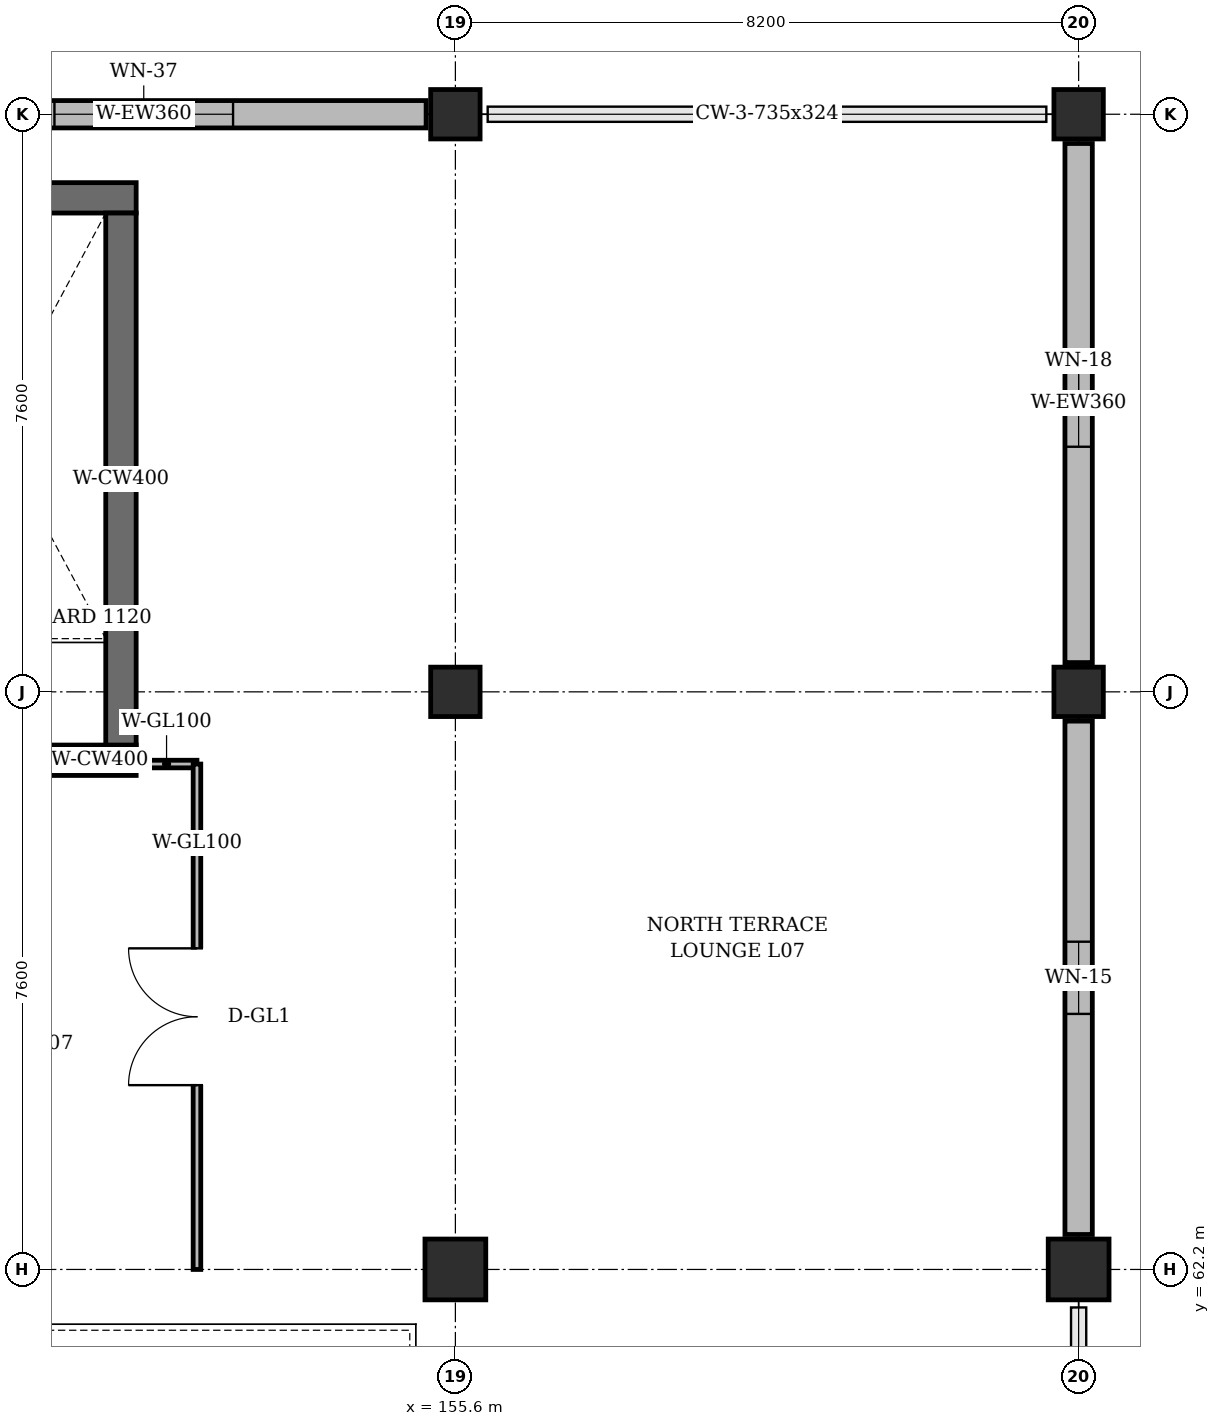
"""IFC4 building model, lengths in metres.
Left out: names, types, materials, properties, quantities, classifications, styles, units other than length and angle.
Written with IfcOpenShell. Run it as: python <this file> out.ifc"""

import sys

from ifc_helpers import new_model, si_unit, direction, frame, frame_2d, origin, origin_2d, place, context, subcontext, project, spatial, rectangle, extrude, element, fill, save


model = new_model("IFC4")
c1 = context("Model", 3, precision=1e-05, world=origin(), true_north=direction((0.0, 1.0)))
c2 = subcontext(c1, "Body", "Model", "MODEL_VIEW")
j1 = project(units=[si_unit("LENGTHUNIT", "METRE"), si_unit("PLANEANGLEUNIT", "RADIAN")], contexts=[c1])
p1 = place(None, origin())
s1 = spatial("IfcSite", under=j1, at=p1, CompositionType="ELEMENT")
p2 = place(p1, origin())
s2 = spatial("IfcBuilding", under=s1, at=p2, CompositionType="ELEMENT")
p3 = place(p2, frame((0.0, 0.0, 32.4)))
s3 = spatial("IfcBuildingStorey", under=s2, at=p3, CompositionType="ELEMENT", Elevation=32.4)
p4 = place(p3, frame((155.6, 62.2, 0.0), z_axis=(0.0, 0.0, 1.0), x_axis=(1.0, 0.0, 0.0)))
e1 = element("IfcColumn", 1, at=p4, inside=s3, PredefinedType="COLUMN", context=c2, shape_type="SweptSolid", body=[
    extrude(rectangle(XDim=0.8, YDim=0.8, at=origin_2d()), origin(), (0.0, 0.0, 1.0), 3.89),
])
for number, where, z_axis, x_axis in (
    (2, (155.6, 69.8, 0.0), (0.0, 0.0, 1.0), (1.0, 0.0, 0.0)),
    (3, (155.6, 77.4, 0.0), (0.0, 0.0, 1.0), (1.0, 0.0, 0.0)),
):
    element("IfcColumn", number, at=place(p3, frame(where, z_axis=z_axis, x_axis=x_axis)), inside=s3, PredefinedType="COLUMN", context=c2, shape_type="SweptSolid", body=[
        extrude(rectangle(XDim=0.65, YDim=0.65, at=origin_2d()), origin(), (0.0, 0.0, 1.0), 3.84),
    ])
p5 = place(p3, frame((163.8, 62.2, 0.0), z_axis=(0.0, 0.0, 1.0), x_axis=(1.0, 0.0, 0.0)))
e4 = element("IfcColumn", 4, at=p5, inside=s3, PredefinedType="COLUMN", context=c2, shape_type="SweptSolid", body=[
    extrude(rectangle(XDim=0.8, YDim=0.8, at=origin_2d()), origin(), (0.0, 0.0, 1.0), 3.89),
])
p6 = place(p3, frame((163.8, 69.8, 0.0), z_axis=(0.0, 0.0, 1.0), x_axis=(1.0, 0.0, 0.0)))
e5 = element("IfcColumn", 5, at=p6, inside=s3, PredefinedType="COLUMN", context=c2, shape_type="SweptSolid", body=[
    extrude(rectangle(XDim=0.65, YDim=0.65, at=origin_2d()), origin(), (0.0, 0.0, 1.0), 3.84),
])
p7 = place(p3, frame((163.8, 77.4, 0.0), z_axis=(0.0, 0.0, 1.0), x_axis=(1.0, 0.0, 0.0)))
e6 = element("IfcColumn", 6, at=p7, inside=s3, PredefinedType="COLUMN", context=c2, shape_type="SweptSolid", body=[
    extrude(rectangle(XDim=0.65, YDim=0.65, at=origin_2d()), origin(), (0.0, 0.0, 1.0), 3.945),
])
p8 = place(p3, frame((163.8, 62.66, 0.0), z_axis=(0.0, 0.0, 1.0), x_axis=(0.0, 1.0, 0.0)))
e7 = element("IfcWall", 7, at=p8, inside=s3, PredefinedType="SOLIDWALL", context=c2, shape_type="SweptSolid", body=[
    extrude(rectangle(XDim=6.755, YDim=0.36, at=frame_2d((3.377, 0.0))), origin(), (0.0, 0.0, 1.0), 3.275),
])
p9 = place(p8, frame((2.903, 0.0, 0.95)))
e8 = element("IfcOpeningElement", 8, at=p9, cuts=e7, PredefinedType="OPENING", context=c2, shape_type="SweptSolid", body=[
    extrude(rectangle(XDim=0.95, YDim=1.75, at=frame_2d((0.475, 0.875))), frame((0.0, 0.192, 0.0), z_axis=(0.0, -1.0, 0.0), x_axis=(1.0, 0.0, 0.0)), (0.0, 0.0, 1.0), 0.384),
])
p10 = place(p3, frame((163.8, 70.185, 0.0), z_axis=(0.0, 0.0, 1.0), x_axis=(0.0, 1.0, 0.0)))
e9 = element("IfcWall", 9, at=p10, inside=s3, PredefinedType="SOLIDWALL", context=c2, shape_type="SweptSolid", body=[
    extrude(rectangle(XDim=6.83, YDim=0.36, at=frame_2d((3.415, 0.0))), origin(), (0.0, 0.0, 1.0), 3.225),
])
p11 = place(p10, frame((2.84, 0.0, 0.95)))
e10 = element("IfcOpeningElement", 10, at=p11, cuts=e9, PredefinedType="OPENING", context=c2, shape_type="SweptSolid", body=[
    extrude(rectangle(XDim=1.15, YDim=1.5, at=frame_2d((0.575, 0.75))), frame((0.0, 0.192, 0.0), z_axis=(0.0, -1.0, 0.0), x_axis=(1.0, 0.0, 0.0)), (0.0, 0.0, 1.0), 0.384),
])
p12 = place(p3, frame((155.215, 77.4, 0.0), z_axis=(0.0, 0.0, 1.0), x_axis=(-1.0, 0.0, 0.0)))
e11 = element("IfcWall", 11, at=p12, inside=s3, PredefinedType="SOLIDWALL", context=c2, shape_type="SweptSolid", body=[
    extrude(rectangle(XDim=7.43, YDim=0.36, at=frame_2d((3.715, 0.0))), origin(), (0.0, 0.0, 1.0), 3.225),
])
p13 = place(p12, frame((2.54, 0.0, 0.95)))
e12 = element("IfcOpeningElement", 12, at=p13, cuts=e11, PredefinedType="OPENING", context=c2, shape_type="SweptSolid", body=[
    extrude(rectangle(XDim=2.35, YDim=1.25, at=frame_2d((1.175, 0.625))), frame((0.0, 0.192, 0.0), z_axis=(0.0, -1.0, 0.0), x_axis=(1.0, 0.0, 0.0)), (0.0, 0.0, 1.0), 0.384),
])
p14 = place(p3, frame((147.6, 68.9, 0.0), z_axis=(0.0, 0.0, 1.0), x_axis=(1.0, 0.0, 0.0)))
e13 = element("IfcWall", 13, at=p14, inside=s3, PredefinedType="SHEAR", context=c2, shape_type="SweptSolid", body=[
    extrude(rectangle(XDim=3.8, YDim=0.4, at=frame_2d((1.9, 0.0))), origin(), (0.0, 0.0, 1.0), 3.89),
])
p15 = place(p14, frame((1.3, 0.0, 0.0)))
e14 = element("IfcOpeningElement", 14, at=p15, cuts=e13, PredefinedType="OPENING", context=c2, shape_type="SweptSolid", body=[
    extrude(rectangle(XDim=1.2, YDim=2.2, at=frame_2d((0.6, 1.1))), frame((0.0, 0.212, 0.0), z_axis=(0.0, -1.0, 0.0), x_axis=(1.0, 0.0, 0.0)), (0.0, 0.0, 1.0), 0.424),
])
p16 = place(p3, frame((147.6, 76.3, 0.0), z_axis=(0.0, 0.0, 1.0), x_axis=(1.0, 0.0, 0.0)))
e15 = element("IfcWall", 15, at=p16, inside=s3, PredefinedType="SHEAR", context=c2, shape_type="SweptSolid", body=[
    extrude(rectangle(XDim=3.8, YDim=0.4, at=frame_2d((1.9, 0.0))), origin(), (0.0, 0.0, 1.0), 3.89),
])
p17 = place(p3, frame((151.2, 69.1, 0.0), z_axis=(0.0, 0.0, 1.0), x_axis=(0.0, 1.0, 0.0)))
e16 = element("IfcWall", 16, at=p17, inside=s3, PredefinedType="SHEAR", context=c2, shape_type="SweptSolid", body=[
    extrude(rectangle(XDim=7.0, YDim=0.4, at=frame_2d((3.5, 0.0))), origin(), (0.0, 0.0, 1.0), 3.89),
])
p18 = place(p3, frame((151.4, 68.85, 0.0), z_axis=(0.0, 0.0, 1.0), x_axis=(1.0, 0.0, 0.0)))
e17 = element("IfcWall", 17, at=p18, inside=s3, PredefinedType="PARTITIONING", context=c2, shape_type="SweptSolid", body=[
    extrude(rectangle(XDim=0.8, YDim=0.1, at=frame_2d((0.4, 0.0))), origin(), (0.0, 0.0, 1.0), 3.805),
])
p19 = place(p3, frame((152.2, 68.85, 0.0), z_axis=(0.0, 0.0, 1.0), x_axis=(0.0, -1.0, 0.0)))
e18 = element("IfcWall", 18, at=p19, inside=s3, PredefinedType="PARTITIONING", context=c2, shape_type="SweptSolid", body=[
    extrude(rectangle(XDim=6.65, YDim=0.1, at=frame_2d((3.325, 0.0))), origin(), (0.0, 0.0, 1.0), 3.805),
])
p20 = place(p19, frame((2.425, 0.0, 0.0)))
e19 = element("IfcOpeningElement", 19, at=p20, cuts=e18, PredefinedType="OPENING", context=c2, shape_type="SweptSolid", body=[
    extrude(rectangle(XDim=1.8, YDim=2.4, at=frame_2d((0.9, 1.2))), frame((0.0, 0.062, 0.0), z_axis=(0.0, -1.0, 0.0), x_axis=(1.0, 0.0, 0.0)), (0.0, 0.0, 1.0), 0.124),
])
p21 = place(p9, origin())
e20 = element("IfcWindow", 20, at=p21, inside=s3, PartitioningType="SINGLE_PANEL", PredefinedType="WINDOW", context=c2, shape_type="SweptSolid", body=[
    extrude(rectangle(XDim=0.95, YDim=1.75, at=frame_2d((0.475, 0.875))), frame((0.0, 0.03, 0.0), z_axis=(0.0, -1.0, 0.0), x_axis=(1.0, 0.0, 0.0)), (0.0, 0.0, 1.0), 0.06),
])
fill(e8, e20)
p22 = place(p11, origin())
e21 = element("IfcWindow", 21, at=p22, inside=s3, PartitioningType="SINGLE_PANEL", PredefinedType="WINDOW", context=c2, shape_type="SweptSolid", body=[
    extrude(rectangle(XDim=1.15, YDim=1.5, at=frame_2d((0.575, 0.75))), frame((0.0, 0.03, 0.0), z_axis=(0.0, -1.0, 0.0), x_axis=(1.0, 0.0, 0.0)), (0.0, 0.0, 1.0), 0.06),
])
fill(e10, e21)
p23 = place(p13, origin())
e22 = element("IfcWindow", 22, at=p23, inside=s3, PartitioningType="DOUBLE_PANEL_VERTICAL", PredefinedType="WINDOW", context=c2, shape_type="SweptSolid", body=[
    extrude(rectangle(XDim=2.35, YDim=1.25, at=frame_2d((1.175, 0.625))), frame((0.0, 0.03, 0.0), z_axis=(0.0, -1.0, 0.0), x_axis=(1.0, 0.0, 0.0)), (0.0, 0.0, 1.0), 0.06),
])
fill(e12, e22)
p24 = place(p20, frame((1.8, 0.0, 0.0), z_axis=(0.0, 0.0, 1.0), x_axis=(-1.0, 0.0, 0.0)))
e23 = element("IfcDoor", 23, at=p24, inside=s3, OperationType="DOUBLE_DOOR_SINGLE_SWING", PredefinedType="DOOR", context=c2, shape_type="SweptSolid", body=[
    extrude(rectangle(XDim=1.8, YDim=2.4, at=frame_2d((0.9, 1.2))), frame((0.0, 0.025, 0.0), z_axis=(0.0, -1.0, 0.0), x_axis=(1.0, 0.0, 0.0)), (0.0, 0.0, 1.0), 0.05),
])
fill(e19, e23)
save(model, sys.argv[1])
